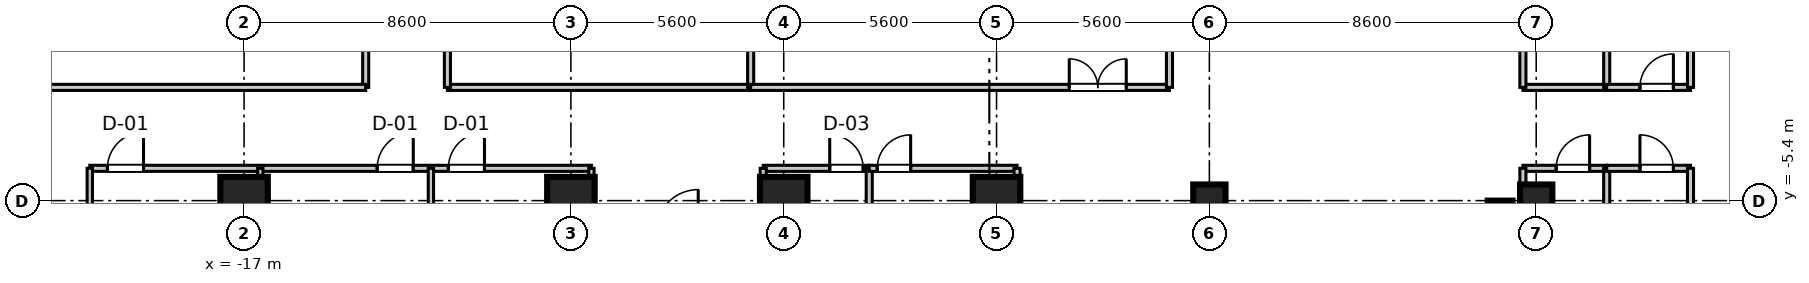
"""IFC4 building model, lengths in metres.
Left out: names, types, materials, properties, quantities, classifications, styles, units other than length and angle.
Written with IfcOpenShell. Run it as: python <this file> out.ifc"""

import sys

from ifc_helpers import new_model, si_unit, direction, frame, frame_2d, origin, origin_2d, place, context, subcontext, project, spatial, rectangle, extrude, source, transform, mapped, element, fill, save


model = new_model("IFC4")
c1 = context("Model", 3, precision=1e-05, world=origin(), true_north=direction((0.0, 1.0)))
c2 = subcontext(c1, "Body", "Model", "MODEL_VIEW")
j1 = project(units=[si_unit("LENGTHUNIT", "METRE"), si_unit("PLANEANGLEUNIT", "RADIAN")], contexts=[c1])
p1 = place(None, origin())
s1 = spatial("IfcSite", under=j1, at=p1, CompositionType="ELEMENT")
p2 = place(p1, origin())
s2 = spatial("IfcBuilding", under=s1, at=p2, CompositionType="ELEMENT")
p3 = place(p2, frame((0.0, 0.0, 117.5)))
s3 = spatial("IfcBuildingStorey", under=s2, at=p3, CompositionType="ELEMENT", Elevation=117.5)
m1 = source(origin(), c2, "Body", "SweptSolid", [
    extrude(rectangle(XDim=1.25, YDim=1.25, at=origin_2d()), origin(), (0.0, 0.0, 1.0), 3.605),
])
for number, where, z_axis, x_axis in (
    (1, (-17.0, -5.4, 0.0), (0.0, 0.0, 1.0), (1.0, 0.0, 0.0)),
    (2, (-8.4, -5.4, 0.0), (0.0, 0.0, 1.0), (1.0, 0.0, 0.0)),
    (3, (-2.8, -5.4, 0.0), (0.0, 0.0, 1.0), (1.0, 0.0, 0.0)),
    (4, (2.8, -5.4, 0.0), (0.0, 0.0, 1.0), (1.0, 0.0, 0.0)),
):
    element("IfcColumn", number, at=place(p3, frame(where, z_axis=z_axis, x_axis=x_axis)), inside=s3, PredefinedType="COLUMN", context=c2, shape_type="MappedRepresentation", body=[
        mapped(m1, transform((0.0, 0.0, 0.0), scale=1.0)),
    ])
m2 = source(origin(), c2, "Body", "SweptSolid", [
    extrude(rectangle(XDim=0.85, YDim=0.85, at=origin_2d()), origin(), (0.0, 0.0, 1.0), 3.605),
])
for number, where, z_axis, x_axis in (
    (5, (8.4, -5.4, 0.0), (0.0, 0.0, 1.0), (1.0, 0.0, 0.0)),
    (6, (17.0, -5.4, 0.0), (0.0, 0.0, 1.0), (1.0, 0.0, 0.0)),
):
    element("IfcColumn", number, at=place(p3, frame(where, z_axis=z_axis, x_axis=x_axis)), inside=s3, PredefinedType="PILASTER", context=c2, shape_type="MappedRepresentation", body=[
        mapped(m2, transform((0.0, 0.0, 0.0), scale=1.0)),
    ])
m3 = source(origin(), c2, "Body", "SweptSolid", [
    extrude(rectangle(XDim=11.6, YDim=0.65, at=frame_2d((5.8, 0.0))), origin(), (0.0, 0.0, 1.0), 3.38),
])
p4 = place(p3, frame((16.05, -17.0, 0.0), z_axis=(0.0, 0.0, 1.0), x_axis=(0.0, 1.0, 0.0)))
e7 = element("IfcWall", 7, at=p4, inside=s3, PredefinedType="SHEAR", context=c2, shape_type="MappedRepresentation", body=[
    mapped(m3, transform((0.0, 0.0, 0.0), scale=1.0)),
])
m4 = source(origin(), c2, "Body", "SweptSolid", [
    extrude(rectangle(XDim=2.205, YDim=0.16, at=frame_2d((1.103, 0.0))), origin(), (0.0, 0.0, 1.0), 2.72),
])
p5 = place(p3, frame((16.65, -4.55, 0.0), z_axis=(0.0, 0.0, 1.0), x_axis=(1.0, 0.0, 0.0)))
e8 = element("IfcWall", 8, at=p5, inside=s3, PredefinedType="PARTITIONING", context=c2, shape_type="MappedRepresentation", body=[
    mapped(m4, transform((0.0, 0.0, 0.0), scale=1.0)),
])
p6 = place(p5, frame((0.875, 0.0, 0.0)))
e9 = element("IfcOpeningElement", 9, at=p6, cuts=e8, PredefinedType="OPENING", context=c2, shape_type="SweptSolid", body=[
    extrude(rectangle(XDim=0.88, YDim=2.1, at=frame_2d((0.44, 1.05))), frame((0.0, 0.09, 0.0), z_axis=(0.0, -1.0, 0.0), x_axis=(1.0, 0.0, 0.0)), (0.0, 0.0, 1.0), 0.18),
])
m5 = source(origin(), c2, "Body", "SweptSolid", [
    extrude(rectangle(XDim=19.25, YDim=0.16, at=frame_2d((9.625, 0.0))), origin(), (0.0, 0.0, 1.0), 2.72),
])
for number, where, z_axis, x_axis in (
    (10, (16.65, -23.8, 0.0), (0.0, 0.0, 1.0), (0.0, 1.0, 0.0)),
    (11, (18.855, -23.8, 0.0), (0.0, 0.0, 1.0), (0.0, 1.0, 0.0)),
):
    element("IfcWall", number, at=place(p3, frame(where, z_axis=z_axis, x_axis=x_axis)), inside=s3, PredefinedType="PARTITIONING", context=c2, shape_type="MappedRepresentation", body=[
        mapped(m5, transform((0.0, 0.0, 0.0), scale=1.0)),
    ])
p7 = place(p3, frame((18.855, -4.55, 0.0), z_axis=(0.0, 0.0, 1.0), x_axis=(1.0, 0.0, 0.0)))
e12 = element("IfcWall", 12, at=p7, inside=s3, PredefinedType="PARTITIONING", context=c2, shape_type="MappedRepresentation", body=[
    mapped(m4, transform((0.0, 0.0, 0.0), scale=1.0)),
])
p8 = place(p7, frame((0.875, 0.0, 0.0)))
e13 = element("IfcOpeningElement", 13, at=p8, cuts=e12, PredefinedType="OPENING", context=c2, shape_type="SweptSolid", body=[
    extrude(rectangle(XDim=0.88, YDim=2.1, at=frame_2d((0.44, 1.05))), frame((0.0, 0.09, 0.0), z_axis=(0.0, -1.0, 0.0), x_axis=(1.0, 0.0, 0.0)), (0.0, 0.0, 1.0), 0.18),
])
m6 = source(origin(), c2, "Body", "SweptSolid", [
    extrude(rectangle(XDim=17.83, YDim=0.16, at=frame_2d((8.915, 0.0))), origin(), (0.0, 0.0, 1.0), 2.72),
])
p9 = place(p3, frame((21.06, -22.38, 0.0), z_axis=(0.0, 0.0, 1.0), x_axis=(0.0, 1.0, 0.0)))
e14 = element("IfcWall", 14, at=p9, inside=s3, PredefinedType="PARTITIONING", context=c2, shape_type="MappedRepresentation", body=[
    mapped(m6, transform((0.0, 0.0, 0.0), scale=1.0)),
])
m7 = source(origin(), c2, "Body", "SweptSolid", [
    extrude(rectangle(XDim=13.2, YDim=0.16, at=frame_2d((6.6, 0.0))), origin(), (0.0, 0.0, 1.0), 2.72),
])
p10 = place(p3, frame((-21.06, -4.55, 0.0), z_axis=(0.0, 0.0, 1.0), x_axis=(1.0, 0.0, 0.0)))
e15 = element("IfcWall", 15, at=p10, inside=s3, PredefinedType="PARTITIONING", context=c2, shape_type="MappedRepresentation", body=[
    mapped(m7, transform((0.0, 0.0, 0.0), scale=1.0)),
])
p11 = place(p10, frame((0.464, 0.0, 0.0)))
e16 = element("IfcOpeningElement", 16, at=p11, cuts=e15, PredefinedType="OPENING", context=c2, shape_type="SweptSolid", body=[
    extrude(rectangle(XDim=0.95, YDim=2.1, at=frame_2d((0.475, 1.05))), frame((0.0, 0.09, 0.0), z_axis=(0.0, -1.0, 0.0), x_axis=(1.0, 0.0, 0.0)), (0.0, 0.0, 1.0), 0.18),
])
p12 = place(p10, frame((7.562, 0.0, 0.0)))
e17 = element("IfcOpeningElement", 17, at=p12, cuts=e15, PredefinedType="OPENING", context=c2, shape_type="SweptSolid", body=[
    extrude(rectangle(XDim=0.95, YDim=2.1, at=frame_2d((0.475, 1.05))), frame((0.0, 0.09, 0.0), z_axis=(0.0, -1.0, 0.0), x_axis=(1.0, 0.0, 0.0)), (0.0, 0.0, 1.0), 0.18),
])
p13 = place(p10, frame((9.435, 0.0, 0.0)))
e18 = element("IfcOpeningElement", 18, at=p13, cuts=e15, PredefinedType="OPENING", context=c2, shape_type="SweptSolid", body=[
    extrude(rectangle(XDim=0.95, YDim=2.1, at=frame_2d((0.475, 1.05))), frame((0.0, 0.09, 0.0), z_axis=(0.0, -1.0, 0.0), x_axis=(1.0, 0.0, 0.0)), (0.0, 0.0, 1.0), 0.18),
])
m8 = source(origin(), c2, "Body", "SweptSolid", [
    extrude(rectangle(XDim=17.83, YDim=0.14, at=frame_2d((8.915, 0.0))), origin(), (0.0, 0.0, 1.0), 2.72),
])
p14 = place(p3, frame((-21.06, -22.38, 0.0), z_axis=(0.0, 0.0, 1.0), x_axis=(0.0, 1.0, 0.0)))
e19 = element("IfcWall", 19, at=p14, inside=s3, PredefinedType="PARTITIONING", context=c2, shape_type="MappedRepresentation", body=[
    mapped(m8, transform((0.0, 0.0, 0.0), scale=1.0)),
])
m9 = source(origin(), c2, "Body", "SweptSolid", [
    extrude(rectangle(XDim=19.25, YDim=0.14, at=frame_2d((9.625, 0.0))), origin(), (0.0, 0.0, 1.0), 2.72),
])
for number, where, z_axis, x_axis in (
    (20, (-7.86, -23.8, 0.0), (0.0, 0.0, 1.0), (0.0, 1.0, 0.0)),
    (21, (-16.572, -23.8, 0.0), (0.0, 0.0, 1.0), (0.0, 1.0, 0.0)),
    (22, (-12.084, -23.8, 0.0), (0.0, 0.0, 1.0), (0.0, 1.0, 0.0)),
):
    element("IfcWall", number, at=place(p3, frame(where, z_axis=z_axis, x_axis=x_axis)), inside=s3, PredefinedType="PARTITIONING", context=c2, shape_type="MappedRepresentation", body=[
        mapped(m9, transform((0.0, 0.0, 0.0), scale=1.0)),
    ])
m10 = source(origin(), c2, "Body", "SweptSolid", [
    extrude(rectangle(XDim=2.79, YDim=0.16, at=frame_2d((1.395, 0.0))), origin(), (0.0, 0.0, 1.0), 2.72),
])
p15 = place(p3, frame((-3.34, -4.55, 0.0), z_axis=(0.0, 0.0, 1.0), x_axis=(1.0, 0.0, 0.0)))
e23 = element("IfcWall", 23, at=p15, inside=s3, PredefinedType="PARTITIONING", context=c2, shape_type="MappedRepresentation", body=[
    mapped(m10, transform((0.0, 0.0, 0.0), scale=1.0)),
])
p16 = place(p15, frame((1.75, 0.0, 0.0)))
e24 = element("IfcOpeningElement", 24, at=p16, cuts=e23, PredefinedType="OPENING", context=c2, shape_type="SweptSolid", body=[
    extrude(rectangle(XDim=0.88, YDim=2.1, at=frame_2d((0.44, 1.05))), frame((0.0, 0.09, 0.0), z_axis=(0.0, -1.0, 0.0), x_axis=(1.0, 0.0, 0.0)), (0.0, 0.0, 1.0), 0.18),
])
for number, where, z_axis, x_axis in (
    (25, (-3.34, -23.8, 0.0), (0.0, 0.0, 1.0), (0.0, 1.0, 0.0)),
    (26, (-0.55, -23.8, 0.0), (0.0, 0.0, 1.0), (0.0, 1.0, 0.0)),
):
    element("IfcWall", number, at=place(p3, frame(where, z_axis=z_axis, x_axis=x_axis)), inside=s3, PredefinedType="PARTITIONING", context=c2, shape_type="MappedRepresentation", body=[
        mapped(m5, transform((0.0, 0.0, 0.0), scale=1.0)),
    ])
m11 = source(origin(), c2, "Body", "SweptSolid", [
    extrude(rectangle(XDim=3.89, YDim=0.16, at=frame_2d((1.945, 0.0))), origin(), (0.0, 0.0, 1.0), 2.72),
])
p17 = place(p3, frame((-0.55, -4.55, 0.0), z_axis=(0.0, 0.0, 1.0), x_axis=(1.0, 0.0, 0.0)))
e27 = element("IfcWall", 27, at=p17, inside=s3, PredefinedType="PARTITIONING", context=c2, shape_type="MappedRepresentation", body=[
    mapped(m11, transform((0.0, 0.0, 0.0), scale=1.0)),
])
p18 = place(p17, frame((0.21, 0.0, 0.0)))
e28 = element("IfcOpeningElement", 28, at=p18, cuts=e27, PredefinedType="OPENING", context=c2, shape_type="SweptSolid", body=[
    extrude(rectangle(XDim=0.88, YDim=2.1, at=frame_2d((0.44, 1.05))), frame((0.0, 0.09, 0.0), z_axis=(0.0, -1.0, 0.0), x_axis=(1.0, 0.0, 0.0)), (0.0, 0.0, 1.0), 0.18),
])
p19 = place(p3, frame((3.34, -23.8, 0.0), z_axis=(0.0, 0.0, 1.0), x_axis=(0.0, 1.0, 0.0)))
e29 = element("IfcWall", 29, at=p19, inside=s3, PredefinedType="PARTITIONING", context=c2, shape_type="MappedRepresentation", body=[
    mapped(m5, transform((0.0, 0.0, 0.0), scale=1.0)),
])
m12 = source(origin(), c2, "Body", "SweptSolid", [
    extrude(rectangle(XDim=4.84, YDim=0.16, at=frame_2d((2.42, 0.0))), origin(), (0.0, 0.0, 1.0), 2.72),
])
p20 = place(p3, frame((-13.8, -2.42, 0.0), z_axis=(0.0, 0.0, 1.0), x_axis=(0.0, 1.0, 0.0)))
e30 = element("IfcWall", 30, at=p20, inside=s3, PredefinedType="PARTITIONING", context=c2, shape_type="MappedRepresentation", body=[
    mapped(m12, transform((0.0, 0.0, 0.0), scale=1.0)),
])
m13 = source(origin(), c2, "Body", "SweptSolid", [
    extrude(rectangle(XDim=10.0, YDim=0.16, at=frame_2d((5.0, 0.0))), origin(), (0.0, 0.0, 1.0), 2.72),
])
p21 = place(p3, frame((-23.8, -2.42, 0.0), z_axis=(0.0, 0.0, 1.0), x_axis=(1.0, 0.0, 0.0)))
e31 = element("IfcWall", 31, at=p21, inside=s3, PredefinedType="PARTITIONING", context=c2, shape_type="MappedRepresentation", body=[
    mapped(m13, transform((0.0, 0.0, 0.0), scale=1.0)),
])
m14 = source(origin(), c2, "Body", "SweptSolid", [
    extrude(rectangle(XDim=7.98, YDim=0.16, at=frame_2d((3.99, 0.0))), origin(), (0.0, 0.0, 1.0), 2.72),
])
p22 = place(p3, frame((-11.65, -2.42, 0.0), z_axis=(0.0, 0.0, 1.0), x_axis=(1.0, 0.0, 0.0)))
e32 = element("IfcWall", 32, at=p22, inside=s3, PredefinedType="PARTITIONING", context=c2, shape_type="MappedRepresentation", body=[
    mapped(m14, transform((0.0, 0.0, 0.0), scale=1.0)),
])
for number, where, z_axis, x_axis in (
    (33, (-11.65, -2.42, 0.0), (0.0, 0.0, 1.0), (0.0, 1.0, 0.0)),
    (34, (-3.67, -2.42, 0.0), (0.0, 0.0, 1.0), (0.0, 1.0, 0.0)),
):
    element("IfcWall", number, at=place(p3, frame(where, z_axis=z_axis, x_axis=x_axis)), inside=s3, PredefinedType="PARTITIONING", context=c2, shape_type="MappedRepresentation", body=[
        mapped(m12, transform((0.0, 0.0, 0.0), scale=1.0)),
    ])
m15 = source(origin(), c2, "Body", "SweptSolid", [
    extrude(rectangle(XDim=11.02, YDim=0.16, at=frame_2d((5.51, 0.0))), origin(), (0.0, 0.0, 1.0), 2.72),
])
p23 = place(p3, frame((-3.67, -2.42, 0.0), z_axis=(0.0, 0.0, 1.0), x_axis=(1.0, 0.0, 0.0)))
e35 = element("IfcWall", 35, at=p23, inside=s3, PredefinedType="PARTITIONING", context=c2, shape_type="MappedRepresentation", body=[
    mapped(m15, transform((0.0, 0.0, 0.0), scale=1.0)),
])
p24 = place(p23, frame((8.383, 0.0, 0.0)))
e36 = element("IfcOpeningElement", 36, at=p24, cuts=e35, PredefinedType="OPENING", context=c2, shape_type="SweptSolid", body=[
    extrude(rectangle(XDim=1.5, YDim=2.15, at=frame_2d((0.75, 1.075))), frame((0.0, 0.09, 0.0), z_axis=(0.0, -1.0, 0.0), x_axis=(1.0, 0.0, 0.0)), (0.0, 0.0, 1.0), 0.18),
])
p25 = place(p3, frame((7.35, -2.42, 0.0), z_axis=(0.0, 0.0, 1.0), x_axis=(0.0, 1.0, 0.0)))
e37 = element("IfcWall", 37, at=p25, inside=s3, PredefinedType="PARTITIONING", context=c2, shape_type="MappedRepresentation", body=[
    mapped(m12, transform((0.0, 0.0, 0.0), scale=1.0)),
])
p26 = place(p3, frame((16.65, -2.42, 0.0), z_axis=(0.0, 0.0, 1.0), x_axis=(1.0, 0.0, 0.0)))
e38 = element("IfcWall", 38, at=p26, inside=s3, PredefinedType="PARTITIONING", context=c2, shape_type="MappedRepresentation", body=[
    mapped(m4, transform((0.0, 0.0, 0.0), scale=1.0)),
])
for number, where, z_axis, x_axis in (
    (39, (16.65, -2.42, 0.0), (0.0, 0.0, 1.0), (0.0, 1.0, 0.0)),
    (40, (18.855, -2.42, 0.0), (0.0, 0.0, 1.0), (0.0, 1.0, 0.0)),
):
    element("IfcWall", number, at=place(p3, frame(where, z_axis=z_axis, x_axis=x_axis)), inside=s3, PredefinedType="PARTITIONING", context=c2, shape_type="MappedRepresentation", body=[
        mapped(m12, transform((0.0, 0.0, 0.0), scale=1.0)),
    ])
p27 = place(p3, frame((18.855, -2.42, 0.0), z_axis=(0.0, 0.0, 1.0), x_axis=(1.0, 0.0, 0.0)))
e41 = element("IfcWall", 41, at=p27, inside=s3, PredefinedType="PARTITIONING", context=c2, shape_type="MappedRepresentation", body=[
    mapped(m4, transform((0.0, 0.0, 0.0), scale=1.0)),
])
p28 = place(p27, frame((0.875, 0.0, 0.0)))
e42 = element("IfcOpeningElement", 42, at=p28, cuts=e41, PredefinedType="OPENING", context=c2, shape_type="SweptSolid", body=[
    extrude(rectangle(XDim=0.88, YDim=2.1, at=frame_2d((0.44, 1.05))), frame((0.0, 0.09, 0.0), z_axis=(0.0, -1.0, 0.0), x_axis=(1.0, 0.0, 0.0)), (0.0, 0.0, 1.0), 0.18),
])
p29 = place(p3, frame((21.06, -2.42, 0.0), z_axis=(0.0, 0.0, 1.0), x_axis=(0.0, 1.0, 0.0)))
e43 = element("IfcWall", 43, at=p29, inside=s3, PredefinedType="PARTITIONING", context=c2, shape_type="MappedRepresentation", body=[
    mapped(m12, transform((0.0, 0.0, 0.0), scale=1.0)),
])
m16 = source(origin(), c2, "Body", "SweptSolid", [
    extrude(rectangle(XDim=0.88, YDim=2.1, at=frame_2d((0.44, 1.05))), frame((0.0, 0.025, 0.0), z_axis=(0.0, -1.0, 0.0), x_axis=(1.0, 0.0, 0.0)), (0.0, 0.0, 1.0), 0.05),
])
p30 = place(p6, frame((0.88, 0.0, 0.0), z_axis=(0.0, 0.0, 1.0), x_axis=(-1.0, 0.0, 0.0)))
e44 = element("IfcDoor", 44, at=p30, inside=s3, OperationType="SINGLE_SWING_RIGHT", PredefinedType="DOOR", context=c2, shape_type="MappedRepresentation", body=[
    mapped(m16, transform((0.0, 0.0, 0.0), scale=1.0)),
])
fill(e9, e44)
p31 = place(p8, frame((0.88, 0.0, 0.0), z_axis=(0.0, 0.0, 1.0), x_axis=(-1.0, 0.0, 0.0)))
e45 = element("IfcDoor", 45, at=p31, inside=s3, OperationType="SINGLE_SWING_LEFT", PredefinedType="DOOR", context=c2, shape_type="MappedRepresentation", body=[
    mapped(m16, transform((0.0, 0.0, 0.0), scale=1.0)),
])
fill(e13, e45)
m17 = source(origin(), c2, "Body", "SweptSolid", [
    extrude(rectangle(XDim=0.95, YDim=2.1, at=frame_2d((0.475, 1.05))), frame((0.0, 0.025, 0.0), z_axis=(0.0, -1.0, 0.0), x_axis=(1.0, 0.0, 0.0)), (0.0, 0.0, 1.0), 0.05),
])
p32 = place(p11, frame((0.95, 0.0, 0.0), z_axis=(0.0, 0.0, 1.0), x_axis=(-1.0, 0.0, 0.0)))
e46 = element("IfcDoor", 46, at=p32, inside=s3, OperationType="SINGLE_SWING_RIGHT", PredefinedType="DOOR", context=c2, shape_type="MappedRepresentation", body=[
    mapped(m17, transform((0.0, 0.0, 0.0), scale=1.0)),
])
fill(e16, e46)
p33 = place(p12, frame((0.95, 0.0, 0.0), z_axis=(0.0, 0.0, 1.0), x_axis=(-1.0, 0.0, 0.0)))
e47 = element("IfcDoor", 47, at=p33, inside=s3, OperationType="SINGLE_SWING_RIGHT", PredefinedType="DOOR", context=c2, shape_type="MappedRepresentation", body=[
    mapped(m17, transform((0.0, 0.0, 0.0), scale=1.0)),
])
fill(e17, e47)
p34 = place(p13, frame((0.95, 0.0, 0.0), z_axis=(0.0, 0.0, 1.0), x_axis=(-1.0, 0.0, 0.0)))
e48 = element("IfcDoor", 48, at=p34, inside=s3, OperationType="SINGLE_SWING_RIGHT", PredefinedType="DOOR", context=c2, shape_type="MappedRepresentation", body=[
    mapped(m17, transform((0.0, 0.0, 0.0), scale=1.0)),
])
fill(e18, e48)
p35 = place(p16, frame((0.88, 0.0, 0.0), z_axis=(0.0, 0.0, 1.0), x_axis=(-1.0, 0.0, 0.0)))
e49 = element("IfcDoor", 49, at=p35, inside=s3, OperationType="SINGLE_SWING_LEFT", PredefinedType="DOOR", context=c2, shape_type="MappedRepresentation", body=[
    mapped(m16, transform((0.0, 0.0, 0.0), scale=1.0)),
])
fill(e24, e49)
p36 = place(p18, frame((0.88, 0.0, 0.0), z_axis=(0.0, 0.0, 1.0), x_axis=(-1.0, 0.0, 0.0)))
e50 = element("IfcDoor", 50, at=p36, inside=s3, OperationType="SINGLE_SWING_RIGHT", PredefinedType="DOOR", context=c2, shape_type="MappedRepresentation", body=[
    mapped(m16, transform((0.0, 0.0, 0.0), scale=1.0)),
])
fill(e28, e50)
m18 = source(origin(), c2, "Body", "SweptSolid", [
    extrude(rectangle(XDim=1.5, YDim=2.15, at=frame_2d((0.75, 1.075))), frame((0.0, 0.025, 0.0), z_axis=(0.0, -1.0, 0.0), x_axis=(1.0, 0.0, 0.0)), (0.0, 0.0, 1.0), 0.05),
])
p37 = place(p24, origin())
e51 = element("IfcDoor", 51, at=p37, inside=s3, OperationType="DOUBLE_DOOR_SINGLE_SWING", PredefinedType="DOOR", context=c2, shape_type="MappedRepresentation", body=[
    mapped(m18, transform((0.0, 0.0, 0.0), scale=1.0)),
])
fill(e36, e51)
p38 = place(p28, origin())
e52 = element("IfcDoor", 52, at=p38, inside=s3, OperationType="SINGLE_SWING_RIGHT", PredefinedType="DOOR", context=c2, shape_type="MappedRepresentation", body=[
    mapped(m16, transform((0.0, 0.0, 0.0), scale=1.0)),
])
fill(e42, e52)
save(model, sys.argv[1])
